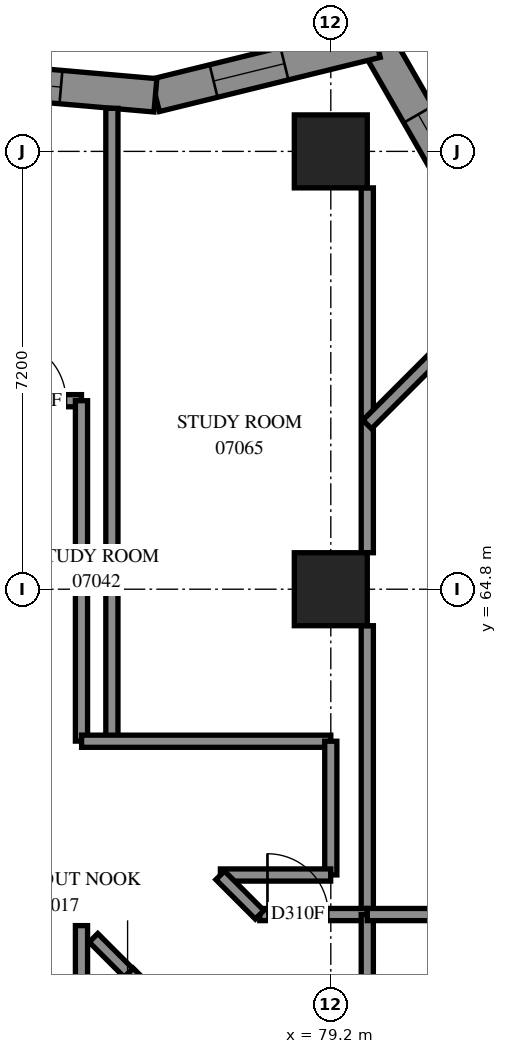
"""IFC4 building model, lengths in metres.
Left out: names, types, materials, properties, quantities, classifications, styles, units other than length and angle.
Written with IfcOpenShell. Run it as: python <this file> out.ifc"""

import sys

from ifc_helpers import new_model, si_unit, direction, frame, frame_2d, origin, origin_2d, place, context, subcontext, project, spatial, polyline, rectangle, outline, extrude, element, fill, save


model = new_model("IFC4")
c1 = context("Model", 3, precision=1e-05, world=origin(), true_north=direction((0.0, 1.0)))
c2 = subcontext(c1, "Body", "Model", "MODEL_VIEW")
j1 = project(units=[si_unit("LENGTHUNIT", "METRE"), si_unit("PLANEANGLEUNIT", "RADIAN")], contexts=[c1])
p1 = place(None, origin())
s1 = spatial("IfcSite", under=j1, at=p1, CompositionType="ELEMENT")
p2 = place(p1, origin())
s2 = spatial("IfcBuilding", under=s1, at=p2, CompositionType="ELEMENT")
p3 = place(p2, frame((0.0, 0.0, 30.4)))
s3 = spatial("IfcBuildingStorey", under=s2, at=p3, CompositionType="ELEMENT", Elevation=30.4)
for number, where, z_axis, x_axis in (
    (1, (79.2, 64.8, 0.0), (0.0, 0.0, 1.0), (1.0, 0.0, 0.0)),
    (2, (79.2, 72.0, 0.0), (0.0, 0.0, 1.0), (1.0, 0.0, 0.0)),
):
    element("IfcColumn", number, at=place(p3, frame(where, z_axis=z_axis, x_axis=x_axis)), inside=s3, PredefinedType="COLUMN", context=c2, shape_type="SweptSolid", body=[
        extrude(rectangle(XDim=1.2, YDim=1.2, at=origin_2d()), origin(), (0.0, 0.0, 1.0), 3.1),
    ])
p4 = place(p3, frame((76.301, 49.443, -0.3), z_axis=(0.0, 0.0, 1.0), x_axis=(0.7071067812, 0.7071067812, 0.0)))
e3 = element("IfcWall", 3, at=p4, inside=s3, PredefinedType="SHEAR", context=c2, shape_type="SweptSolid", body=[
    extrude(rectangle(XDim=14.4, YDim=1.0, at=frame_2d((7.2, 0.0))), origin(), (0.0, 0.0, 1.0), 2.7),
])
p5 = place(p4, frame((4.55, 0.0, 0.3)))
e4 = element("IfcOpeningElement", 4, at=p5, cuts=e3, PredefinedType="OPENING", context=c2, shape_type="SweptSolid", body=[
    extrude(rectangle(XDim=1.1, YDim=2.1, at=frame_2d((0.55, 1.05))), frame((0.0, 0.51, 0.0), z_axis=(0.0, -1.0, 0.0), x_axis=(1.0, 0.0, 0.0)), (0.0, 0.0, 1.0), 1.02),
])
p6 = place(p4, frame((11.35, 0.0, 0.3)))
e5 = element("IfcOpeningElement", 5, at=p6, cuts=e3, PredefinedType="OPENING", context=c2, shape_type="SweptSolid", body=[
    extrude(rectangle(XDim=1.1, YDim=2.1, at=frame_2d((0.55, 1.05))), frame((0.0, 0.51, 0.0), z_axis=(0.0, -1.0, 0.0), x_axis=(1.0, 0.0, 0.0)), (0.0, 0.0, 1.0), 1.02),
])
p7 = place(p3, frame((81.637, 70.867, 0.0), z_axis=(0.0, 0.0, 1.0), x_axis=(-0.497425467, 0.8675067174, 0.0)))
e6 = element("IfcWall", 6, at=p7, inside=s3, PredefinedType="SOLIDWALL", context=c2, shape_type="SweptSolid", body=[
    extrude(outline(polyline([(0.05, -0.275), (3.604, -0.275), (3.19, 0.275), (-0.05, 0.275), (0.05, -0.275)])), origin(), (0.0, 0.0, 1.0), 3.1),
])
p8 = place(p7, frame((0.808, 0.0, 0.5)))
e7 = element("IfcOpeningElement", 7, at=p8, cuts=e6, PredefinedType="OPENING", context=c2, shape_type="SweptSolid", body=[
    extrude(rectangle(XDim=1.2, YDim=2.45, at=frame_2d((0.6, 1.225))), frame((0.0, 0.285, 0.0), z_axis=(0.0, -1.0, 0.0), x_axis=(1.0, 0.0, 0.0)), (0.0, 0.0, 1.0), 0.57),
])
p9 = place(p3, frame((79.947, 73.814, 0.0), z_axis=(0.0, 0.0, 1.0), x_axis=(-0.9711610885, -0.2384242862, 0.0)))
e8 = element("IfcWall", 8, at=p9, inside=s3, PredefinedType="SOLIDWALL", context=c2, shape_type="SweptSolid", body=[
    extrude(outline(polyline([(-0.207, -0.275), (3.694, -0.275), (3.785, 0.275), (0.207, 0.275), (-0.207, -0.275)])), origin(), (0.0, 0.0, 1.0), 3.1),
])
p10 = place(p9, frame((1.554, 0.0, 0.5)))
e9 = element("IfcOpeningElement", 9, at=p10, cuts=e8, PredefinedType="OPENING", context=c2, shape_type="SweptSolid", body=[
    extrude(rectangle(XDim=1.2, YDim=2.45, at=frame_2d((0.6, 1.225))), frame((0.0, 0.285, 0.0), z_axis=(0.0, -1.0, 0.0), x_axis=(1.0, 0.0, 0.0)), (0.0, 0.0, 1.0), 0.57),
])
p11 = place(p3, frame((76.316, 72.922, 0.0), z_axis=(0.0, 0.0, 1.0), x_axis=(-0.9962265436, 0.0867909782, 0.0)))
e10 = element("IfcWall", 10, at=p11, inside=s3, PredefinedType="SOLIDWALL", context=c2, shape_type="SweptSolid", body=[
    extrude(outline(polyline([(0.045, -0.275), (3.848, -0.275), (3.8, 0.275), (-0.045, 0.275), (0.045, -0.275)])), origin(), (0.0, 0.0, 1.0), 3.1),
])
p12 = place(p11, frame((1.559, 0.0, 0.5)))
e11 = element("IfcOpeningElement", 11, at=p12, cuts=e10, PredefinedType="OPENING", context=c2, shape_type="SweptSolid", body=[
    extrude(rectangle(XDim=1.2, YDim=2.45, at=frame_2d((0.6, 1.225))), frame((0.0, 0.285, 0.0), z_axis=(0.0, -1.0, 0.0), x_axis=(1.0, 0.0, 0.0)), (0.0, 0.0, 1.0), 0.57),
])
p13 = place(p3, frame((54.5, 67.9, 0.0), z_axis=(0.0, 0.0, 1.0), x_axis=(1.0, 0.0, 0.0)))
e12 = element("IfcWall", 12, at=p13, inside=s3, PredefinedType="PARTITIONING", context=c2, shape_type="SweptSolid", body=[
    extrude(rectangle(XDim=20.6, YDim=0.2, at=frame_2d((10.3, 0.0))), origin(), (0.0, 0.0, 1.0), 3.1),
])
p14 = place(p13, frame((0.255, 0.0, 0.0)))
e13 = element("IfcOpeningElement", 13, at=p14, cuts=e12, PredefinedType="OPENING", context=c2, shape_type="SweptSolid", body=[
    extrude(rectangle(XDim=1.0, YDim=2.1, at=frame_2d((0.5, 1.05))), frame((0.0, 0.11, 0.0), z_axis=(0.0, -1.0, 0.0), x_axis=(1.0, 0.0, 0.0)), (0.0, 0.0, 1.0), 0.22),
])
p15 = place(p13, frame((19.345, 0.0, 0.0)))
e14 = element("IfcOpeningElement", 14, at=p15, cuts=e12, PredefinedType="OPENING", context=c2, shape_type="SweptSolid", body=[
    extrude(rectangle(XDim=1.0, YDim=2.1, at=frame_2d((0.5, 1.05))), frame((0.0, 0.11, 0.0), z_axis=(0.0, -1.0, 0.0), x_axis=(1.0, 0.0, 0.0)), (0.0, 0.0, 1.0), 0.22),
])
p16 = place(p13, frame((5.45, 0.0, 0.0)))
e15 = element("IfcOpeningElement", 15, at=p16, cuts=e12, PredefinedType="OPENING", context=c2, shape_type="SweptSolid", body=[
    extrude(rectangle(XDim=0.9, YDim=2.1, at=frame_2d((0.45, 1.05))), frame((0.0, 0.11, 0.0), z_axis=(0.0, -1.0, 0.0), x_axis=(1.0, 0.0, 0.0)), (0.0, 0.0, 1.0), 0.22),
])
p17 = place(p13, frame((7.1, 0.0, 0.0)))
e16 = element("IfcOpeningElement", 16, at=p17, cuts=e12, PredefinedType="OPENING", context=c2, shape_type="SweptSolid", body=[
    extrude(rectangle(XDim=0.9, YDim=2.1, at=frame_2d((0.45, 1.05))), frame((0.0, 0.11, 0.0), z_axis=(0.0, -1.0, 0.0), x_axis=(1.0, 0.0, 0.0)), (0.0, 0.0, 1.0), 0.22),
])
p18 = place(p13, frame((12.65, 0.0, 0.0)))
e17 = element("IfcOpeningElement", 17, at=p18, cuts=e12, PredefinedType="OPENING", context=c2, shape_type="SweptSolid", body=[
    extrude(rectangle(XDim=0.9, YDim=2.1, at=frame_2d((0.45, 1.05))), frame((0.0, 0.11, 0.0), z_axis=(0.0, -1.0, 0.0), x_axis=(1.0, 0.0, 0.0)), (0.0, 0.0, 1.0), 0.22),
])
p19 = place(p13, frame((14.3, 0.0, 0.0)))
e18 = element("IfcOpeningElement", 18, at=p19, cuts=e12, PredefinedType="OPENING", context=c2, shape_type="SweptSolid", body=[
    extrude(rectangle(XDim=0.9, YDim=2.1, at=frame_2d((0.45, 1.05))), frame((0.0, 0.11, 0.0), z_axis=(0.0, -1.0, 0.0), x_axis=(1.0, 0.0, 0.0)), (0.0, 0.0, 1.0), 0.22),
])
p20 = place(p3, frame((75.6, 62.3, 0.0), z_axis=(0.0, 0.0, 1.0), x_axis=(0.0, 1.0, 0.0)))
e19 = element("IfcWall", 19, at=p20, inside=s3, PredefinedType="PARTITIONING", context=c2, shape_type="SweptSolid", body=[
    extrude(rectangle(XDim=10.408, YDim=0.2, at=frame_2d((5.204, 0.0))), origin(), (0.0, 0.0, 1.0), 3.1),
])
p21 = place(p3, frame((79.8, 65.4, 0.0), z_axis=(0.0, 0.0, 1.0), x_axis=(0.0, 1.0, 0.0)))
e20 = element("IfcWall", 20, at=p21, inside=s3, PredefinedType="PARTITIONING", context=c2, shape_type="SweptSolid", body=[
    extrude(rectangle(XDim=6.0, YDim=0.2, at=frame_2d((3.0, 0.0))), origin(), (0.0, 0.0, 1.0), 3.1),
])
p22 = place(p3, frame((75.1, 62.302, 0.0), z_axis=(0.0, 0.0, 1.0), x_axis=(0.0, 1.0, 0.0)))
e21 = element("IfcWall", 21, at=p22, inside=s3, PredefinedType="PARTITIONING", context=c2, shape_type="SweptSolid", body=[
    extrude(rectangle(XDim=5.598, YDim=0.2, at=frame_2d((2.799, 0.0))), origin(), (0.0, 0.0, 1.0), 3.1),
])
p23 = place(p3, frame((79.8, 59.45, 0.0), z_axis=(0.0, 0.0, 1.0), x_axis=(0.0, 1.0, 0.0)))
e22 = element("IfcWall", 22, at=p23, inside=s3, PredefinedType="PARTITIONING", context=c2, shape_type="SweptSolid", body=[
    extrude(rectangle(XDim=4.75, YDim=0.2, at=frame_2d((2.375, 0.0))), origin(), (0.0, 0.0, 1.0), 3.1),
])
p24 = place(p3, frame((75.1, 55.102, 0.0), z_axis=(0.0, 0.0, 1.0), x_axis=(0.0, 1.0, 0.0)))
e23 = element("IfcWall", 23, at=p24, inside=s3, PredefinedType="PARTITIONING", context=c2, shape_type="SweptSolid", body=[
    extrude(rectangle(XDim=4.166, YDim=0.2, at=frame_2d((2.083, 0.0))), origin(), (0.0, 0.0, 1.0), 3.1),
])
p25 = place(p3, frame((75.102, 62.3, 0.0), z_axis=(0.0, 0.0, 1.0), x_axis=(1.0, 0.0, 0.0)))
e24 = element("IfcWall", 24, at=p25, inside=s3, PredefinedType="PARTITIONING", context=c2, shape_type="SweptSolid", body=[
    extrude(rectangle(XDim=4.098, YDim=0.2, at=frame_2d((2.049, 0.0))), origin(), (0.0, 0.0, 1.0), 3.1),
])
p26 = place(p3, frame((79.799, 67.509, 0.0), z_axis=(0.0, 0.0, 1.0), x_axis=(0.7070924981, 0.707121064, 0.0)))
e25 = element("IfcWall", 25, at=p26, inside=s3, PredefinedType="PARTITIONING", context=c2, shape_type="SweptSolid", body=[
    extrude(rectangle(XDim=3.501, YDim=0.2, at=frame_2d((1.75, 0.0))), origin(), (0.0, 0.0, 1.0), 3.1),
])
p27 = place(p3, frame((79.2, 60.102, 0.0), z_axis=(0.0, 0.0, 1.0), x_axis=(0.0, 1.0, 0.0)))
e26 = element("IfcWall", 26, at=p27, inside=s3, PredefinedType="PARTITIONING", context=c2, shape_type="SweptSolid", body=[
    extrude(rectangle(XDim=2.198, YDim=0.2, at=frame_2d((1.099, 0.0))), origin(), (0.0, 0.0, 1.0), 3.1),
])
p28 = place(p3, frame((75.879, 58.497, 0.0), z_axis=(0.0, 0.0, 1.0), x_axis=(0.7075866635, -0.706626573, 0.0)))
e27 = element("IfcWall", 27, at=p28, inside=s3, PredefinedType="PARTITIONING", context=c2, shape_type="SweptSolid", body=[
    extrude(rectangle(XDim=2.083, YDim=0.2, at=frame_2d((1.042, 0.0))), origin(), (0.0, 0.0, 1.0), 3.1),
])
p29 = place(p3, frame((77.384, 60.1, 0.0), z_axis=(0.0, 0.0, 1.0), x_axis=(1.0, 0.0, 0.0)))
e28 = element("IfcWall", 28, at=p29, inside=s3, PredefinedType="PARTITIONING", context=c2, shape_type="SweptSolid", body=[
    extrude(rectangle(XDim=1.814, YDim=0.2, at=frame_2d((0.907, 0.0))), origin(), (0.0, 0.0, 1.0), 3.1),
])
p30 = place(p3, frame((78.032, 59.45, 0.0), z_axis=(0.0, 0.0, 1.0), x_axis=(1.0, 0.0, 0.0)))
e29 = element("IfcWall", 29, at=p30, inside=s3, PredefinedType="PARTITIONING", context=c2, shape_type="SweptSolid", body=[
    extrude(rectangle(XDim=1.768, YDim=0.2, at=frame_2d((0.884, 0.0))), origin(), (0.0, 0.0, 1.0), 3.1),
])
p31 = place(p30, frame((0.126, 0.0, 0.0)))
e30 = element("IfcOpeningElement", 30, at=p31, cuts=e29, PredefinedType="OPENING", context=c2, shape_type="SweptSolid", body=[
    extrude(rectangle(XDim=1.0, YDim=2.1, at=frame_2d((0.5, 1.05))), frame((0.0, 0.11, 0.0), z_axis=(0.0, -1.0, 0.0), x_axis=(1.0, 0.0, 0.0)), (0.0, 0.0, 1.0), 0.22),
])
p32 = place(p3, frame((79.8, 58.2, 0.0), z_axis=(0.0, 0.0, 1.0), x_axis=(0.0, 1.0, 0.0)))
e31 = element("IfcWall", 31, at=p32, inside=s3, PredefinedType="PARTITIONING", context=c2, shape_type="SweptSolid", body=[
    extrude(rectangle(XDim=1.25, YDim=0.2, at=frame_2d((0.625, 0.0))), origin(), (0.0, 0.0, 1.0), 3.1),
])
p33 = place(p3, frame((79.8, 59.45, 0.0), z_axis=(0.0, 0.0, 1.0), x_axis=(1.0, 0.0, 0.0)))
e32 = element("IfcWall", 32, at=p33, inside=s3, PredefinedType="PARTITIONING", context=c2, shape_type="SweptSolid", body=[
    extrude(rectangle(XDim=1.248, YDim=0.2, at=frame_2d((0.624, 0.0))), origin(), (0.0, 0.0, 1.0), 3.1),
])
p34 = place(p3, frame((77.381, 60.095, 0.0), z_axis=(0.0, 0.0, 1.0), x_axis=(0.7071067812, -0.7071067812, 0.0)))
e33 = element("IfcWall", 33, at=p34, inside=s3, PredefinedType="PARTITIONING", context=c2, shape_type="SweptSolid", body=[
    extrude(rectangle(XDim=0.916, YDim=0.2, at=frame_2d((0.458, 0.0))), origin(), (0.0, 0.0, 1.0), 3.1),
])
p35 = place(p3, frame((75.297, 59.067, 0.0), z_axis=(0.0, 0.0, 1.0), x_axis=(0.7071067812, -0.7071067812, 0.0)))
e34 = element("IfcWall", 34, at=p35, inside=s3, PredefinedType="PARTITIONING", context=c2, shape_type="SweptSolid", body=[
    extrude(rectangle(XDim=0.815, YDim=0.2, at=frame_2d((0.407, 0.0))), origin(), (0.0, 0.0, 1.0), 3.1),
])
p36 = place(p8, origin())
e35 = element("IfcWindow", 35, at=p36, inside=s3, PartitioningType="SINGLE_PANEL", PredefinedType="WINDOW", context=c2, shape_type="SweptSolid", body=[
    extrude(rectangle(XDim=1.2, YDim=2.45, at=frame_2d((0.6, 1.225))), frame((0.0, 0.155, 0.0), z_axis=(0.0, -1.0, 0.0), x_axis=(1.0, 0.0, 0.0)), (0.0, 0.0, 1.0), 0.06),
])
fill(e7, e35)
p37 = place(p10, origin())
e36 = element("IfcWindow", 36, at=p37, inside=s3, PartitioningType="SINGLE_PANEL", PredefinedType="WINDOW", context=c2, shape_type="SweptSolid", body=[
    extrude(rectangle(XDim=1.2, YDim=2.45, at=frame_2d((0.6, 1.225))), frame((0.0, 0.155, 0.0), z_axis=(0.0, -1.0, 0.0), x_axis=(1.0, 0.0, 0.0)), (0.0, 0.0, 1.0), 0.06),
])
fill(e9, e36)
p38 = place(p12, origin())
e37 = element("IfcWindow", 37, at=p38, inside=s3, PartitioningType="SINGLE_PANEL", PredefinedType="WINDOW", context=c2, shape_type="SweptSolid", body=[
    extrude(rectangle(XDim=1.2, YDim=2.45, at=frame_2d((0.6, 1.225))), frame((0.0, 0.155, 0.0), z_axis=(0.0, -1.0, 0.0), x_axis=(1.0, 0.0, 0.0)), (0.0, 0.0, 1.0), 0.06),
])
fill(e11, e37)
p39 = place(p15, origin())
e38 = element("IfcDoor", 38, at=p39, inside=s3, OperationType="SINGLE_SWING_RIGHT", PredefinedType="DOOR", context=c2, shape_type="SweptSolid", body=[
    extrude(rectangle(XDim=1.0, YDim=2.1, at=frame_2d((0.5, 1.05))), frame((0.0, 0.025, 0.0), z_axis=(0.0, -1.0, 0.0), x_axis=(1.0, 0.0, 0.0)), (0.0, 0.0, 1.0), 0.05),
])
fill(e14, e38)
p40 = place(p31, origin())
e39 = element("IfcDoor", 39, at=p40, inside=s3, OperationType="SINGLE_SWING_LEFT", PredefinedType="DOOR", context=c2, shape_type="SweptSolid", body=[
    extrude(rectangle(XDim=1.0, YDim=2.1, at=frame_2d((0.5, 1.05))), frame((0.0, 0.025, 0.0), z_axis=(0.0, -1.0, 0.0), x_axis=(1.0, 0.0, 0.0)), (0.0, 0.0, 1.0), 0.05),
])
fill(e30, e39)
save(model, sys.argv[1])
